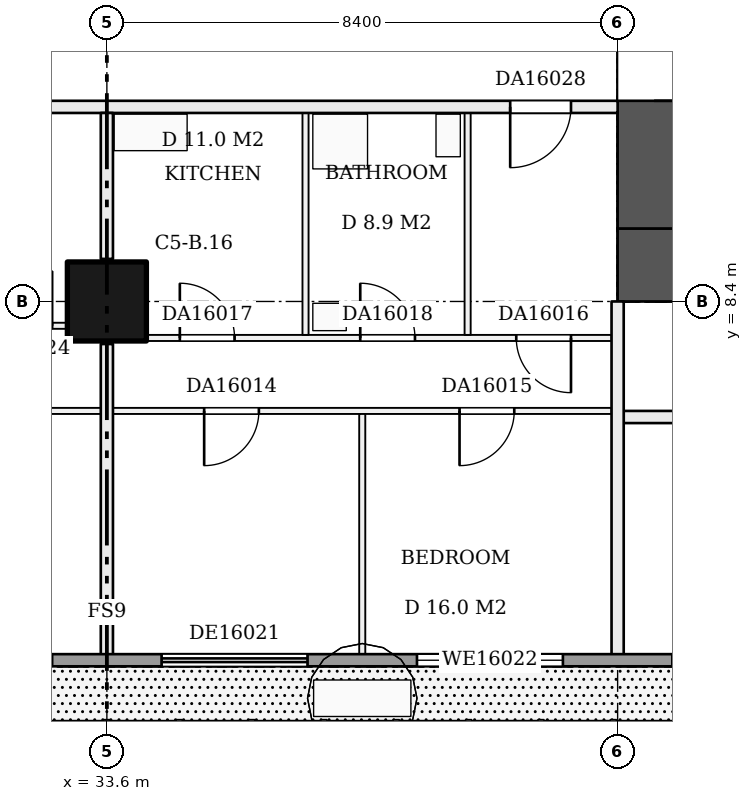
"""IFC4 building model, lengths in metres.
Left out: names, types, materials, properties, quantities, classifications, styles, units other than length and angle.
Written with IfcOpenShell. Run it as: python <this file> out.ifc"""

import sys

from ifc_helpers import new_model, si_unit, direction, frame, frame_2d, origin, origin_2d, place, context, subcontext, project, spatial, rectangle, extrude, element, fill, save


model = new_model("IFC4")
c1 = context("Model", 3, precision=1e-05, world=origin(), true_north=direction((0.0, 1.0)))
c2 = subcontext(c1, "Body", "Model", "MODEL_VIEW")
j1 = project(units=[si_unit("LENGTHUNIT", "METRE"), si_unit("PLANEANGLEUNIT", "RADIAN")], contexts=[c1])
p1 = place(None, origin())
s1 = spatial("IfcSite", under=j1, at=p1, CompositionType="ELEMENT")
p2 = place(p1, origin())
s2 = spatial("IfcBuilding", under=s1, at=p2, CompositionType="ELEMENT")
p3 = place(p2, frame((0.0, 0.0, 67.2)))
s3 = spatial("IfcBuildingStorey", under=s2, at=p3, CompositionType="ELEMENT", Elevation=67.2)
p4 = place(p3, frame((33.6, 8.4, 0.0), z_axis=(0.0, 0.0, 1.0), x_axis=(1.0, 0.0, 0.0)))
e1 = element("IfcColumn", 1, at=p4, inside=s3, PredefinedType="COLUMN", context=c2, shape_type="SweptSolid", body=[
    extrude(rectangle(XDim=1.3, YDim=1.3, at=origin_2d()), origin(), (0.0, 0.0, 1.0), 3.22),
])
p5 = place(p3, frame((42.0, 9.0, 0.0), z_axis=(0.0, 0.0, 1.0), x_axis=(1.0, 0.0, 0.0)))
e2 = element("IfcWall", 2, at=p5, inside=s3, PredefinedType="SHEAR", context=c2, shape_type="SweptSolid", body=[
    extrude(rectangle(XDim=16.8, YDim=1.2, at=frame_2d((8.4, 0.0))), origin(), (0.0, 0.0, 1.0), 3.22),
])
p6 = place(p5, frame((3.1, 0.0, 0.0)))
e3 = element("IfcOpeningElement", 3, at=p6, cuts=e2, PredefinedType="OPENING", context=c2, shape_type="SweptSolid", body=[
    extrude(rectangle(XDim=1.0, YDim=2.1, at=frame_2d((0.5, 1.05))), frame((0.0, 0.61, 0.0), z_axis=(0.0, -1.0, 0.0), x_axis=(1.0, 0.0, 0.0)), (0.0, 0.0, 1.0), 1.22),
])
p7 = place(p5, frame((12.7, 0.0, 0.0)))
e4 = element("IfcOpeningElement", 4, at=p7, cuts=e2, PredefinedType="OPENING", context=c2, shape_type="SweptSolid", body=[
    extrude(rectangle(XDim=1.0, YDim=2.1, at=frame_2d((0.5, 1.05))), frame((0.0, 0.61, 0.0), z_axis=(0.0, -1.0, 0.0), x_axis=(1.0, 0.0, 0.0)), (0.0, 0.0, 1.0), 1.22),
])
p8 = place(p3, frame((42.6, 9.6, 0.0), z_axis=(0.0, 0.0, 1.0), x_axis=(0.0, 1.0, 0.0)))
e5 = element("IfcWall", 5, at=p8, inside=s3, PredefinedType="SHEAR", context=c2, shape_type="SweptSolid", body=[
    extrude(rectangle(XDim=14.4, YDim=1.2, at=frame_2d((7.2, 0.0))), origin(), (0.0, 0.0, 1.0), 3.22),
])
p9 = place(p8, frame((2.1, 0.0, 0.0)))
e6 = element("IfcOpeningElement", 6, at=p9, cuts=e5, PredefinedType="OPENING", context=c2, shape_type="SweptSolid", body=[
    extrude(rectangle(XDim=1.8, YDim=2.1, at=frame_2d((0.9, 1.05))), frame((0.0, 0.61, 0.0), z_axis=(0.0, -1.0, 0.0), x_axis=(1.0, 0.0, 0.0)), (0.0, 0.0, 1.0), 1.22),
])
p10 = place(p3, frame((42.1, 6.5, 0.0), z_axis=(0.0, 0.0, 1.0), x_axis=(1.0, 0.0, 0.0)))
e7 = element("IfcWall", 7, at=p10, inside=s3, PredefinedType="PARTITIONING", context=c2, shape_type="SweptSolid", body=[
    extrude(rectangle(XDim=18.7, YDim=0.2, at=frame_2d((9.35, 0.0))), origin(), (0.0, 0.0, 1.0), 3.22),
])
p11 = place(p10, frame((4.6, 0.0, 0.0)))
e8 = element("IfcOpeningElement", 8, at=p11, cuts=e7, PredefinedType="OPENING", context=c2, shape_type="SweptSolid", body=[
    extrude(rectangle(XDim=1.0, YDim=2.1, at=frame_2d((0.5, 1.05))), frame((0.0, 0.11, 0.0), z_axis=(0.0, -1.0, 0.0), x_axis=(1.0, 0.0, 0.0)), (0.0, 0.0, 1.0), 0.22),
])
p12 = place(p10, frame((10.9, 0.0, 0.0)))
e9 = element("IfcOpeningElement", 9, at=p12, cuts=e7, PredefinedType="OPENING", context=c2, shape_type="SweptSolid", body=[
    extrude(rectangle(XDim=1.0, YDim=2.1, at=frame_2d((0.5, 1.05))), frame((0.0, 0.11, 0.0), z_axis=(0.0, -1.0, 0.0), x_axis=(1.0, 0.0, 0.0)), (0.0, 0.0, 1.0), 0.22),
])
p13 = place(p10, frame((17.1, 0.0, 0.0)))
e10 = element("IfcOpeningElement", 10, at=p13, cuts=e7, PredefinedType="OPENING", context=c2, shape_type="SweptSolid", body=[
    extrude(rectangle(XDim=1.0, YDim=2.1, at=frame_2d((0.5, 1.05))), frame((0.0, 0.11, 0.0), z_axis=(0.0, -1.0, 0.0), x_axis=(1.0, 0.0, 0.0)), (0.0, 0.0, 1.0), 0.22),
])
p14 = place(p3, frame((12.65, 6.6, 0.0), z_axis=(0.0, 0.0, 1.0), x_axis=(1.0, 0.0, 0.0)))
e11 = element("IfcWall", 11, at=p14, inside=s3, PredefinedType="PARTITIONING", context=c2, shape_type="SweptSolid", body=[
    extrude(rectangle(XDim=29.25, YDim=0.1, at=frame_2d((14.625, 0.0))), origin(), (0.0, 0.0, 1.0), 3.22),
])
p15 = place(p14, frame((1.65, 0.0, 0.0)))
e12 = element("IfcOpeningElement", 12, at=p15, cuts=e11, PredefinedType="OPENING", context=c2, shape_type="SweptSolid", body=[
    extrude(rectangle(XDim=0.9, YDim=2.1, at=frame_2d((0.45, 1.05))), frame((0.0, 0.06, 0.0), z_axis=(0.0, -1.0, 0.0), x_axis=(1.0, 0.0, 0.0)), (0.0, 0.0, 1.0), 0.12),
])
p16 = place(p14, frame((6.89, 0.0, 0.0)))
e13 = element("IfcOpeningElement", 13, at=p16, cuts=e11, PredefinedType="OPENING", context=c2, shape_type="SweptSolid", body=[
    extrude(rectangle(XDim=0.9, YDim=2.1, at=frame_2d((0.45, 1.05))), frame((0.0, 0.06, 0.0), z_axis=(0.0, -1.0, 0.0), x_axis=(1.0, 0.0, 0.0)), (0.0, 0.0, 1.0), 0.12),
])
p17 = place(p14, frame((4.85, 0.0, 0.0)))
e14 = element("IfcOpeningElement", 14, at=p17, cuts=e11, PredefinedType="OPENING", context=c2, shape_type="SweptSolid", body=[
    extrude(rectangle(XDim=0.9, YDim=2.1, at=frame_2d((0.45, 1.05))), frame((0.0, 0.06, 0.0), z_axis=(0.0, -1.0, 0.0), x_axis=(1.0, 0.0, 0.0)), (0.0, 0.0, 1.0), 0.12),
])
p18 = place(p14, frame((10.05, 0.0, 0.0)))
e15 = element("IfcOpeningElement", 15, at=p18, cuts=e11, PredefinedType="OPENING", context=c2, shape_type="SweptSolid", body=[
    extrude(rectangle(XDim=0.9, YDim=2.1, at=frame_2d((0.45, 1.05))), frame((0.0, 0.06, 0.0), z_axis=(0.0, -1.0, 0.0), x_axis=(1.0, 0.0, 0.0)), (0.0, 0.0, 1.0), 0.12),
])
p19 = place(p14, frame((16.25, 0.0, 0.0)))
e16 = element("IfcOpeningElement", 16, at=p19, cuts=e11, PredefinedType="OPENING", context=c2, shape_type="SweptSolid", body=[
    extrude(rectangle(XDim=0.9, YDim=2.1, at=frame_2d((0.45, 1.05))), frame((0.0, 0.06, 0.0), z_axis=(0.0, -1.0, 0.0), x_axis=(1.0, 0.0, 0.0)), (0.0, 0.0, 1.0), 0.12),
])
p20 = place(p14, frame((22.55, 0.0, 0.0)))
e17 = element("IfcOpeningElement", 17, at=p20, cuts=e11, PredefinedType="OPENING", context=c2, shape_type="SweptSolid", body=[
    extrude(rectangle(XDim=0.9, YDim=2.1, at=frame_2d((0.45, 1.05))), frame((0.0, 0.06, 0.0), z_axis=(0.0, -1.0, 0.0), x_axis=(1.0, 0.0, 0.0)), (0.0, 0.0, 1.0), 0.12),
])
p21 = place(p14, frame((26.75, 0.0, 0.0)))
e18 = element("IfcOpeningElement", 18, at=p21, cuts=e11, PredefinedType="OPENING", context=c2, shape_type="SweptSolid", body=[
    extrude(rectangle(XDim=0.9, YDim=2.1, at=frame_2d((0.45, 1.05))), frame((0.0, 0.06, 0.0), z_axis=(0.0, -1.0, 0.0), x_axis=(1.0, 0.0, 0.0)), (0.0, 0.0, 1.0), 0.12),
])
p22 = place(p3, frame((33.7, 7.8, 0.0), z_axis=(0.0, 0.0, 1.0), x_axis=(1.0, 0.0, 0.0)))
e19 = element("IfcWall", 19, at=p22, inside=s3, PredefinedType="PARTITIONING", context=c2, shape_type="SweptSolid", body=[
    extrude(rectangle(XDim=8.2, YDim=0.1, at=frame_2d((4.1, 0.0))), origin(), (0.0, 0.0, 1.0), 3.22),
])
p23 = place(p22, frame((6.633, 0.0, 0.0)))
e20 = element("IfcOpeningElement", 20, at=p23, cuts=e19, PredefinedType="OPENING", context=c2, shape_type="SweptSolid", body=[
    extrude(rectangle(XDim=0.9, YDim=2.1, at=frame_2d((0.45, 1.05))), frame((0.0, 0.06, 0.0), z_axis=(0.0, -1.0, 0.0), x_axis=(1.0, 0.0, 0.0)), (0.0, 0.0, 1.0), 0.12),
])
p24 = place(p22, frame((1.1, 0.0, 0.0)))
e21 = element("IfcOpeningElement", 21, at=p24, cuts=e19, PredefinedType="OPENING", context=c2, shape_type="SweptSolid", body=[
    extrude(rectangle(XDim=0.9, YDim=2.1, at=frame_2d((0.45, 1.05))), frame((0.0, 0.06, 0.0), z_axis=(0.0, -1.0, 0.0), x_axis=(1.0, 0.0, 0.0)), (0.0, 0.0, 1.0), 0.12),
])
p25 = place(p22, frame((4.067, 0.0, 0.0)))
e22 = element("IfcOpeningElement", 22, at=p25, cuts=e19, PredefinedType="OPENING", context=c2, shape_type="SweptSolid", body=[
    extrude(rectangle(XDim=0.9, YDim=2.1, at=frame_2d((0.45, 1.05))), frame((0.0, 0.06, 0.0), z_axis=(0.0, -1.0, 0.0), x_axis=(1.0, 0.0, 0.0)), (0.0, 0.0, 1.0), 0.12),
])
p26 = place(p3, frame((21.1, 8.0, 0.0), z_axis=(0.0, 0.0, 1.0), x_axis=(1.0, 0.0, 0.0)))
e23 = element("IfcWall", 23, at=p26, inside=s3, PredefinedType="PARTITIONING", context=c2, shape_type="SweptSolid", body=[
    extrude(rectangle(XDim=12.4, YDim=0.1, at=frame_2d((6.2, 0.0))), origin(), (0.0, 0.0, 1.0), 3.22),
])
p27 = place(p26, frame((1.0, 0.0, 0.0)))
e24 = element("IfcOpeningElement", 24, at=p27, cuts=e23, PredefinedType="OPENING", context=c2, shape_type="SweptSolid", body=[
    extrude(rectangle(XDim=0.9, YDim=2.1, at=frame_2d((0.45, 1.05))), frame((0.0, 0.06, 0.0), z_axis=(0.0, -1.0, 0.0), x_axis=(1.0, 0.0, 0.0)), (0.0, 0.0, 1.0), 0.12),
])
p28 = place(p26, frame((5.0, 0.0, 0.0)))
e25 = element("IfcOpeningElement", 25, at=p28, cuts=e23, PredefinedType="OPENING", context=c2, shape_type="SweptSolid", body=[
    extrude(rectangle(XDim=0.9, YDim=2.1, at=frame_2d((0.45, 1.05))), frame((0.0, 0.06, 0.0), z_axis=(0.0, -1.0, 0.0), x_axis=(1.0, 0.0, 0.0)), (0.0, 0.0, 1.0), 0.12),
])
p29 = place(p26, frame((7.6, 0.0, 0.0)))
e26 = element("IfcOpeningElement", 26, at=p29, cuts=e23, PredefinedType="OPENING", context=c2, shape_type="SweptSolid", body=[
    extrude(rectangle(XDim=0.9, YDim=2.1, at=frame_2d((0.45, 1.05))), frame((0.0, 0.06, 0.0), z_axis=(0.0, -1.0, 0.0), x_axis=(1.0, 0.0, 0.0)), (0.0, 0.0, 1.0), 0.12),
])
p30 = place(p26, frame((10.7, 0.0, 0.0)))
e27 = element("IfcOpeningElement", 27, at=p30, cuts=e23, PredefinedType="OPENING", context=c2, shape_type="SweptSolid", body=[
    extrude(rectangle(XDim=0.9, YDim=2.1, at=frame_2d((0.45, 1.05))), frame((0.0, 0.06, 0.0), z_axis=(0.0, -1.0, 0.0), x_axis=(1.0, 0.0, 0.0)), (0.0, 0.0, 1.0), 0.12),
])
p31 = place(p3, frame((11.5, 11.6, 0.0), z_axis=(0.0, 0.0, 1.0), x_axis=(1.0, 0.0, 0.0)))
e28 = element("IfcWall", 28, at=p31, inside=s3, PredefinedType="PARTITIONING", context=c2, shape_type="SweptSolid", body=[
    extrude(rectangle(XDim=30.5, YDim=0.2, at=frame_2d((15.25, 0.0))), origin(), (0.0, 0.0, 1.0), 3.22),
])
p32 = place(p31, frame((1.6, 0.0, 0.0)))
e29 = element("IfcOpeningElement", 29, at=p32, cuts=e28, PredefinedType="OPENING", context=c2, shape_type="SweptSolid", body=[
    extrude(rectangle(XDim=1.0, YDim=2.1, at=frame_2d((0.5, 1.05))), frame((0.0, 0.11, 0.0), z_axis=(0.0, -1.0, 0.0), x_axis=(1.0, 0.0, 0.0)), (0.0, 0.0, 1.0), 0.22),
])
p33 = place(p31, frame((8.04, 0.0, 0.0)))
e30 = element("IfcOpeningElement", 30, at=p33, cuts=e28, PredefinedType="OPENING", context=c2, shape_type="SweptSolid", body=[
    extrude(rectangle(XDim=1.0, YDim=2.1, at=frame_2d((0.5, 1.05))), frame((0.0, 0.11, 0.0), z_axis=(0.0, -1.0, 0.0), x_axis=(1.0, 0.0, 0.0)), (0.0, 0.0, 1.0), 0.22),
])
p34 = place(p31, frame((10.5, 0.0, 0.0)))
e31 = element("IfcOpeningElement", 31, at=p34, cuts=e28, PredefinedType="OPENING", context=c2, shape_type="SweptSolid", body=[
    extrude(rectangle(XDim=1.0, YDim=2.1, at=frame_2d((0.5, 1.05))), frame((0.0, 0.11, 0.0), z_axis=(0.0, -1.0, 0.0), x_axis=(1.0, 0.0, 0.0)), (0.0, 0.0, 1.0), 0.22),
])
p35 = place(p31, frame((28.733, 0.0, 0.0)))
e32 = element("IfcOpeningElement", 32, at=p35, cuts=e28, PredefinedType="OPENING", context=c2, shape_type="SweptSolid", body=[
    extrude(rectangle(XDim=1.0, YDim=2.1, at=frame_2d((0.5, 1.05))), frame((0.0, 0.11, 0.0), z_axis=(0.0, -1.0, 0.0), x_axis=(1.0, 0.0, 0.0)), (0.0, 0.0, 1.0), 0.22),
])
p36 = place(p3, frame((33.6, 2.5, 0.0), z_axis=(0.0, 0.0, 1.0), x_axis=(0.0, 1.0, 0.0)))
e33 = element("IfcWall", 33, at=p36, inside=s3, PredefinedType="PARTITIONING", context=c2, shape_type="SweptSolid", body=[
    extrude(rectangle(XDim=5.2, YDim=0.2, at=frame_2d((2.6, 0.0))), origin(), (0.0, 0.0, 1.0), 3.22),
])
p37 = place(p3, frame((33.6, 9.1, 0.0), z_axis=(0.0, 0.0, 1.0), x_axis=(0.0, 1.0, 0.0)))
e34 = element("IfcWall", 34, at=p37, inside=s3, PredefinedType="PARTITIONING", context=c2, shape_type="SweptSolid", body=[
    extrude(rectangle(XDim=2.4, YDim=0.2, at=frame_2d((1.2, 0.0))), origin(), (0.0, 0.0, 1.0), 3.22),
])
p38 = place(p3, frame((36.867, 7.85, 0.0), z_axis=(0.0, 0.0, 1.0), x_axis=(0.0, 1.0, 0.0)))
e35 = element("IfcWall", 35, at=p38, inside=s3, PredefinedType="PARTITIONING", context=c2, shape_type="SweptSolid", body=[
    extrude(rectangle(XDim=3.65, YDim=0.1, at=frame_2d((1.825, 0.0))), origin(), (0.0, 0.0, 1.0), 3.22),
])
p39 = place(p3, frame((37.8, 2.5, 0.0), z_axis=(0.0, 0.0, 1.0), x_axis=(0.0, 1.0, 0.0)))
e36 = element("IfcWall", 36, at=p39, inside=s3, PredefinedType="PARTITIONING", context=c2, shape_type="SweptSolid", body=[
    extrude(rectangle(XDim=4.05, YDim=0.1, at=frame_2d((2.025, 0.0))), origin(), (0.0, 0.0, 1.0), 3.22),
])
p40 = place(p3, frame((39.533, 7.85, 0.0), z_axis=(0.0, 0.0, 1.0), x_axis=(0.0, 1.0, 0.0)))
e37 = element("IfcWall", 37, at=p40, inside=s3, PredefinedType="PARTITIONING", context=c2, shape_type="SweptSolid", body=[
    extrude(rectangle(XDim=3.65, YDim=0.1, at=frame_2d((1.825, 0.0))), origin(), (0.0, 0.0, 1.0), 3.22),
])
p41 = place(p3, frame((42.0, 2.5, 0.0), z_axis=(0.0, 0.0, 1.0), x_axis=(0.0, 1.0, 0.0)))
e38 = element("IfcWall", 38, at=p41, inside=s3, PredefinedType="PARTITIONING", context=c2, shape_type="SweptSolid", body=[
    extrude(rectangle(XDim=5.9, YDim=0.2, at=frame_2d((2.95, 0.0))), origin(), (0.0, 0.0, 1.0), 3.22),
])
p42 = place(p3, frame((4.8, 2.5, 0.0), z_axis=(0.0, 0.0, 1.0), x_axis=(1.0, 0.0, 0.0)))
e39 = element("IfcWall", 39, at=p42, inside=s3, PredefinedType="SOLIDWALL", context=c2, shape_type="SweptSolid", body=[
    extrude(rectangle(XDim=57.6, YDim=0.2, at=frame_2d((28.8, 0.0))), origin(), (0.0, 0.0, 1.0), 3.22),
])
p43 = place(p42, frame((0.3, 0.0, 0.0)))
e40 = element("IfcOpeningElement", 40, at=p43, cuts=e39, PredefinedType="OPENING", context=c2, shape_type="SweptSolid", body=[
    extrude(rectangle(XDim=2.4, YDim=2.2, at=frame_2d((1.2, 1.1))), frame((0.0, 0.11, 0.0), z_axis=(0.0, -1.0, 0.0), x_axis=(1.0, 0.0, 0.0)), (0.0, 0.0, 1.0), 0.22),
])
p44 = place(p42, frame((4.5, 0.0, 0.9)))
e41 = element("IfcOpeningElement", 41, at=p44, cuts=e39, PredefinedType="OPENING", context=c2, shape_type="SweptSolid", body=[
    extrude(rectangle(XDim=2.4, YDim=1.5, at=frame_2d((1.2, 0.75))), frame((0.0, 0.11, 0.0), z_axis=(0.0, -1.0, 0.0), x_axis=(1.0, 0.0, 0.0)), (0.0, 0.0, 1.0), 0.22),
])
p45 = place(p42, frame((8.7, 0.0, 0.9)))
e42 = element("IfcOpeningElement", 42, at=p45, cuts=e39, PredefinedType="OPENING", context=c2, shape_type="SweptSolid", body=[
    extrude(rectangle(XDim=2.4, YDim=1.5, at=frame_2d((1.2, 0.75))), frame((0.0, 0.11, 0.0), z_axis=(0.0, -1.0, 0.0), x_axis=(1.0, 0.0, 0.0)), (0.0, 0.0, 1.0), 0.22),
])
p46 = place(p42, frame((12.9, 0.0, 0.0)))
e43 = element("IfcOpeningElement", 43, at=p46, cuts=e39, PredefinedType="OPENING", context=c2, shape_type="SweptSolid", body=[
    extrude(rectangle(XDim=2.4, YDim=2.2, at=frame_2d((1.2, 1.1))), frame((0.0, 0.11, 0.0), z_axis=(0.0, -1.0, 0.0), x_axis=(1.0, 0.0, 0.0)), (0.0, 0.0, 1.0), 0.22),
])
p47 = place(p42, frame((17.1, 0.0, 0.9)))
e44 = element("IfcOpeningElement", 44, at=p47, cuts=e39, PredefinedType="OPENING", context=c2, shape_type="SweptSolid", body=[
    extrude(rectangle(XDim=2.4, YDim=1.5, at=frame_2d((1.2, 0.75))), frame((0.0, 0.11, 0.0), z_axis=(0.0, -1.0, 0.0), x_axis=(1.0, 0.0, 0.0)), (0.0, 0.0, 1.0), 0.22),
])
p48 = place(p42, frame((21.3, 0.0, 0.0)))
e45 = element("IfcOpeningElement", 45, at=p48, cuts=e39, PredefinedType="OPENING", context=c2, shape_type="SweptSolid", body=[
    extrude(rectangle(XDim=2.4, YDim=2.2, at=frame_2d((1.2, 1.1))), frame((0.0, 0.11, 0.0), z_axis=(0.0, -1.0, 0.0), x_axis=(1.0, 0.0, 0.0)), (0.0, 0.0, 1.0), 0.22),
])
p49 = place(p42, frame((25.5, 0.0, 0.0)))
e46 = element("IfcOpeningElement", 46, at=p49, cuts=e39, PredefinedType="OPENING", context=c2, shape_type="SweptSolid", body=[
    extrude(rectangle(XDim=2.4, YDim=2.2, at=frame_2d((1.2, 1.1))), frame((0.0, 0.11, 0.0), z_axis=(0.0, -1.0, 0.0), x_axis=(1.0, 0.0, 0.0)), (0.0, 0.0, 1.0), 0.22),
])
p50 = place(p42, frame((29.7, 0.0, 0.0)))
e47 = element("IfcOpeningElement", 47, at=p50, cuts=e39, PredefinedType="OPENING", context=c2, shape_type="SweptSolid", body=[
    extrude(rectangle(XDim=2.4, YDim=2.2, at=frame_2d((1.2, 1.1))), frame((0.0, 0.11, 0.0), z_axis=(0.0, -1.0, 0.0), x_axis=(1.0, 0.0, 0.0)), (0.0, 0.0, 1.0), 0.22),
])
p51 = place(p42, frame((33.9, 0.0, 0.9)))
e48 = element("IfcOpeningElement", 48, at=p51, cuts=e39, PredefinedType="OPENING", context=c2, shape_type="SweptSolid", body=[
    extrude(rectangle(XDim=2.4, YDim=1.5, at=frame_2d((1.2, 0.75))), frame((0.0, 0.11, 0.0), z_axis=(0.0, -1.0, 0.0), x_axis=(1.0, 0.0, 0.0)), (0.0, 0.0, 1.0), 0.22),
])
p52 = place(p42, frame((38.1, 0.0, 0.0)))
e49 = element("IfcOpeningElement", 49, at=p52, cuts=e39, PredefinedType="OPENING", context=c2, shape_type="SweptSolid", body=[
    extrude(rectangle(XDim=2.4, YDim=2.2, at=frame_2d((1.2, 1.1))), frame((0.0, 0.11, 0.0), z_axis=(0.0, -1.0, 0.0), x_axis=(1.0, 0.0, 0.0)), (0.0, 0.0, 1.0), 0.22),
])
p53 = place(p42, frame((42.3, 0.0, 0.9)))
e50 = element("IfcOpeningElement", 50, at=p53, cuts=e39, PredefinedType="OPENING", context=c2, shape_type="SweptSolid", body=[
    extrude(rectangle(XDim=2.4, YDim=1.5, at=frame_2d((1.2, 0.75))), frame((0.0, 0.11, 0.0), z_axis=(0.0, -1.0, 0.0), x_axis=(1.0, 0.0, 0.0)), (0.0, 0.0, 1.0), 0.22),
])
p54 = place(p42, frame((46.5, 0.0, 0.9)))
e51 = element("IfcOpeningElement", 51, at=p54, cuts=e39, PredefinedType="OPENING", context=c2, shape_type="SweptSolid", body=[
    extrude(rectangle(XDim=2.4, YDim=1.5, at=frame_2d((1.2, 0.75))), frame((0.0, 0.11, 0.0), z_axis=(0.0, -1.0, 0.0), x_axis=(1.0, 0.0, 0.0)), (0.0, 0.0, 1.0), 0.22),
])
p55 = place(p42, frame((50.7, 0.0, 0.0)))
e52 = element("IfcOpeningElement", 52, at=p55, cuts=e39, PredefinedType="OPENING", context=c2, shape_type="SweptSolid", body=[
    extrude(rectangle(XDim=2.4, YDim=2.2, at=frame_2d((1.2, 1.1))), frame((0.0, 0.11, 0.0), z_axis=(0.0, -1.0, 0.0), x_axis=(1.0, 0.0, 0.0)), (0.0, 0.0, 1.0), 0.22),
])
p56 = place(p42, frame((54.9, 0.0, 0.9)))
e53 = element("IfcOpeningElement", 53, at=p56, cuts=e39, PredefinedType="OPENING", context=c2, shape_type="SweptSolid", body=[
    extrude(rectangle(XDim=2.4, YDim=1.5, at=frame_2d((1.2, 0.75))), frame((0.0, 0.11, 0.0), z_axis=(0.0, -1.0, 0.0), x_axis=(1.0, 0.0, 0.0)), (0.0, 0.0, 1.0), 0.22),
])
p57 = place(p9, frame((1.8, 0.0, 0.0), z_axis=(0.0, 0.0, 1.0), x_axis=(-1.0, 0.0, 0.0)))
e54 = element("IfcDoor", 54, at=p57, inside=s3, OperationType="DOUBLE_DOOR_SINGLE_SWING", PredefinedType="DOOR", context=c2, shape_type="SweptSolid", body=[
    extrude(rectangle(XDim=1.8, YDim=2.1, at=frame_2d((0.9, 1.05))), frame((0.0, 0.025, 0.0), z_axis=(0.0, -1.0, 0.0), x_axis=(1.0, 0.0, 0.0)), (0.0, 0.0, 1.0), 0.05),
])
fill(e6, e54)
p58 = place(p20, frame((0.9, 0.0, 0.0), z_axis=(0.0, 0.0, 1.0), x_axis=(-1.0, 0.0, 0.0)))
e55 = element("IfcDoor", 55, at=p58, inside=s3, OperationType="SINGLE_SWING_RIGHT", PredefinedType="DOOR", context=c2, shape_type="SweptSolid", body=[
    extrude(rectangle(XDim=0.9, YDim=2.1, at=frame_2d((0.45, 1.05))), frame((0.0, 0.025, 0.0), z_axis=(0.0, -1.0, 0.0), x_axis=(1.0, 0.0, 0.0)), (0.0, 0.0, 1.0), 0.05),
])
fill(e17, e55)
p59 = place(p21, frame((0.9, 0.0, 0.0), z_axis=(0.0, 0.0, 1.0), x_axis=(-1.0, 0.0, 0.0)))
e56 = element("IfcDoor", 56, at=p59, inside=s3, OperationType="SINGLE_SWING_RIGHT", PredefinedType="DOOR", context=c2, shape_type="SweptSolid", body=[
    extrude(rectangle(XDim=0.9, YDim=2.1, at=frame_2d((0.45, 1.05))), frame((0.0, 0.025, 0.0), z_axis=(0.0, -1.0, 0.0), x_axis=(1.0, 0.0, 0.0)), (0.0, 0.0, 1.0), 0.05),
])
fill(e18, e56)
p60 = place(p23, frame((0.9, 0.0, 0.0), z_axis=(0.0, 0.0, 1.0), x_axis=(-1.0, 0.0, 0.0)))
e57 = element("IfcDoor", 57, at=p60, inside=s3, OperationType="SINGLE_SWING_LEFT", PredefinedType="DOOR", context=c2, shape_type="SweptSolid", body=[
    extrude(rectangle(XDim=0.9, YDim=2.1, at=frame_2d((0.45, 1.05))), frame((0.0, 0.025, 0.0), z_axis=(0.0, -1.0, 0.0), x_axis=(1.0, 0.0, 0.0)), (0.0, 0.0, 1.0), 0.05),
])
fill(e20, e57)
p61 = place(p24, origin())
e58 = element("IfcDoor", 58, at=p61, inside=s3, OperationType="SINGLE_SWING_LEFT", PredefinedType="DOOR", context=c2, shape_type="SweptSolid", body=[
    extrude(rectangle(XDim=0.9, YDim=2.1, at=frame_2d((0.45, 1.05))), frame((0.0, 0.025, 0.0), z_axis=(0.0, -1.0, 0.0), x_axis=(1.0, 0.0, 0.0)), (0.0, 0.0, 1.0), 0.05),
])
fill(e21, e58)
p62 = place(p25, origin())
e59 = element("IfcDoor", 59, at=p62, inside=s3, OperationType="SINGLE_SWING_LEFT", PredefinedType="DOOR", context=c2, shape_type="SweptSolid", body=[
    extrude(rectangle(XDim=0.9, YDim=2.1, at=frame_2d((0.45, 1.05))), frame((0.0, 0.025, 0.0), z_axis=(0.0, -1.0, 0.0), x_axis=(1.0, 0.0, 0.0)), (0.0, 0.0, 1.0), 0.05),
])
fill(e22, e59)
p63 = place(p35, frame((1.0, 0.0, 0.0), z_axis=(0.0, 0.0, 1.0), x_axis=(-1.0, 0.0, 0.0)))
e60 = element("IfcDoor", 60, at=p63, inside=s3, OperationType="SINGLE_SWING_RIGHT", PredefinedType="DOOR", context=c2, shape_type="SweptSolid", body=[
    extrude(rectangle(XDim=1.0, YDim=2.1, at=frame_2d((0.5, 1.05))), frame((0.0, 0.025, 0.0), z_axis=(0.0, -1.0, 0.0), x_axis=(1.0, 0.0, 0.0)), (0.0, 0.0, 1.0), 0.05),
])
fill(e32, e60)
p64 = place(p50, origin())
e61 = element("IfcDoor", 61, at=p64, inside=s3, OperationType="DOUBLE_DOOR_SLIDING", PredefinedType="DOOR", context=c2, shape_type="SweptSolid", body=[
    extrude(rectangle(XDim=2.4, YDim=2.2, at=frame_2d((1.2, 1.1))), frame((0.0, 0.025, 0.0), z_axis=(0.0, -1.0, 0.0), x_axis=(1.0, 0.0, 0.0)), (0.0, 0.0, 1.0), 0.05),
])
fill(e47, e61)
p65 = place(p51, origin())
e62 = element("IfcWindow", 62, at=p65, inside=s3, PartitioningType="SINGLE_PANEL", PredefinedType="WINDOW", context=c2, shape_type="SweptSolid", body=[
    extrude(rectangle(XDim=2.4, YDim=1.5, at=frame_2d((1.2, 0.75))), frame((0.0, 0.03, 0.0), z_axis=(0.0, -1.0, 0.0), x_axis=(1.0, 0.0, 0.0)), (0.0, 0.0, 1.0), 0.06),
])
fill(e48, e62)
save(model, sys.argv[1])
